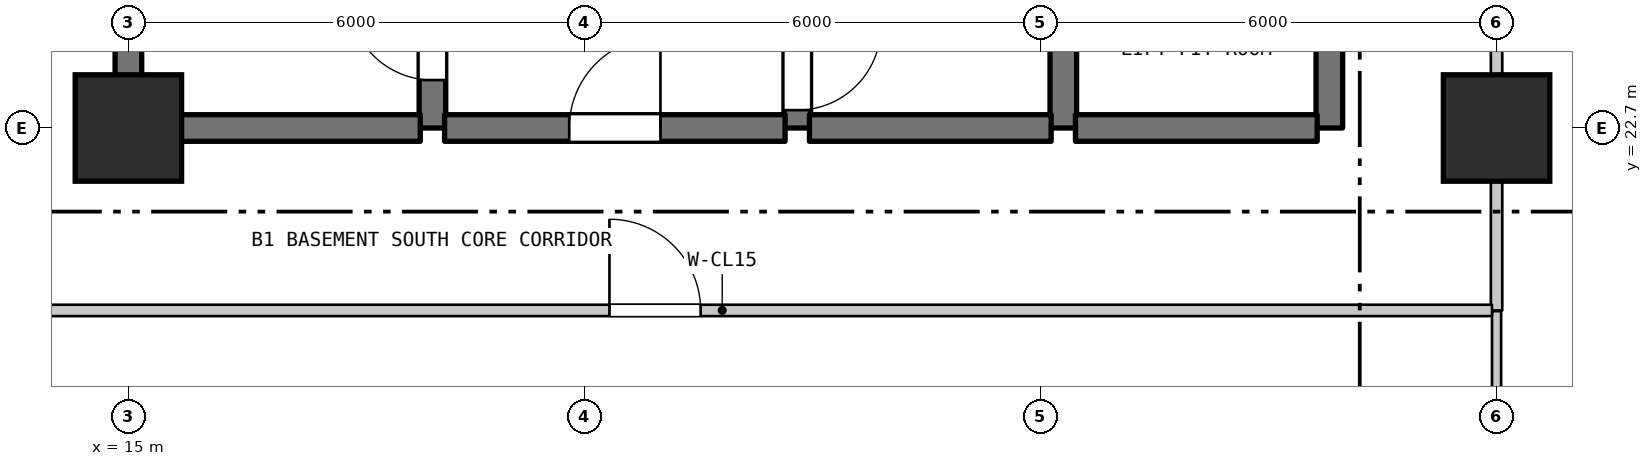
"""IFC4 building model, lengths in metres.
Left out: names, types, materials, properties, quantities, classifications, styles, units other than length and angle.
Written with IfcOpenShell. Run it as: python <this file> out.ifc"""

import sys

from ifc_helpers import new_model, si_unit, direction, frame, frame_2d, origin, origin_2d, place, context, subcontext, project, spatial, rectangle, extrude, element, fill, save


model = new_model("IFC4")
c1 = context("Model", 3, precision=1e-05, world=origin(), true_north=direction((0.0, 1.0)))
c2 = subcontext(c1, "Body", "Model", "MODEL_VIEW")
j1 = project(units=[si_unit("LENGTHUNIT", "METRE"), si_unit("PLANEANGLEUNIT", "RADIAN")], contexts=[c1])
p1 = place(None, origin())
s1 = spatial("IfcSite", under=j1, at=p1, CompositionType="ELEMENT")
p2 = place(p1, origin())
s2 = spatial("IfcBuilding", under=s1, at=p2, CompositionType="ELEMENT")
p3 = place(p2, frame((0.0, 0.0, -4.5)))
s3 = spatial("IfcBuildingStorey", under=s2, at=p3, CompositionType="ELEMENT", Elevation=-4.5)
p4 = place(p3, frame((15.0, 22.7, 0.0), z_axis=(0.0, 0.0, 1.0), x_axis=(1.0, 0.0, 0.0)))
e1 = element("IfcColumn", 1, at=p4, inside=s3, PredefinedType="COLUMN", context=c2, shape_type="SweptSolid", body=[
    extrude(rectangle(XDim=1.4, YDim=1.4, at=origin_2d()), origin(), (0.0, 0.0, 1.0), 4.5),
])
p5 = place(p3, frame((33.0, 22.7, 0.0), z_axis=(0.0, 0.0, 1.0), x_axis=(1.0, 0.0, 0.0)))
e2 = element("IfcColumn", 2, at=p5, inside=s3, PredefinedType="PILASTER", context=c2, shape_type="SweptSolid", body=[
    extrude(rectangle(XDim=1.4, YDim=1.4, at=origin_2d()), origin(), (0.0, 0.0, 1.0), 4.5),
])
p6 = place(p3, frame((15.0, 22.7, 0.0), z_axis=(0.0, 0.0, 1.0), x_axis=(0.0, 1.0, 0.0)))
e3 = element("IfcWall", 3, at=p6, inside=s3, PredefinedType="SHEAR", context=c2, shape_type="SweptSolid", body=[
    extrude(rectangle(XDim=6.8, YDim=0.35, at=frame_2d((3.4, 0.0))), origin(), (0.0, 0.0, 1.0), 4.1),
])
p7 = place(p3, frame((19.0, 22.7, 0.0), z_axis=(0.0, 0.0, 1.0), x_axis=(0.0, 1.0, 0.0)))
e4 = element("IfcWall", 4, at=p7, inside=s3, PredefinedType="SHEAR", context=c2, shape_type="SweptSolid", body=[
    extrude(rectangle(XDim=5.5, YDim=0.35, at=frame_2d((2.75, 0.0))), origin(), (0.0, 0.0, 1.0), 4.1),
])
p8 = place(p7, frame((0.631, 0.0, 0.0)))
e5 = element("IfcOpeningElement", 5, at=p8, cuts=e4, PredefinedType="OPENING", context=c2, shape_type="SweptSolid", body=[
    extrude(rectangle(XDim=1.1, YDim=2.15, at=frame_2d((0.55, 1.075))), frame((0.0, 0.185, 0.0), z_axis=(0.0, -1.0, 0.0), x_axis=(1.0, 0.0, 0.0)), (0.0, 0.0, 1.0), 0.37),
])
p9 = place(p3, frame((23.8, 22.7, 0.0), z_axis=(0.0, 0.0, 1.0), x_axis=(0.0, 1.0, 0.0)))
e6 = element("IfcWall", 6, at=p9, inside=s3, PredefinedType="SHEAR", context=c2, shape_type="SweptSolid", body=[
    extrude(rectangle(XDim=5.5, YDim=0.35, at=frame_2d((2.75, 0.0))), origin(), (0.0, 0.0, 1.0), 4.1),
])
p10 = place(p9, frame((0.235, 0.0, 0.0)))
e7 = element("IfcOpeningElement", 7, at=p10, cuts=e6, PredefinedType="OPENING", context=c2, shape_type="SweptSolid", body=[
    extrude(rectangle(XDim=1.1, YDim=2.15, at=frame_2d((0.55, 1.075))), frame((0.0, 0.185, 0.0), z_axis=(0.0, -1.0, 0.0), x_axis=(1.0, 0.0, 0.0)), (0.0, 0.0, 1.0), 0.37),
])
for number, where, z_axis, x_axis in (
    (8, (27.3, 22.7, 0.0), (0.0, 0.0, 1.0), (0.0, 1.0, 0.0)),
    (9, (30.8, 22.7, 0.0), (0.0, 0.0, 1.0), (0.0, 1.0, 0.0)),
):
    element("IfcWall", number, at=place(p3, frame(where, z_axis=z_axis, x_axis=x_axis)), inside=s3, PredefinedType="SHEAR", context=c2, shape_type="SweptSolid", body=[
        extrude(rectangle(XDim=2.9, YDim=0.35, at=frame_2d((1.45, 0.0))), origin(), (0.0, 0.0, 1.0), 4.1),
    ])
p11 = place(p3, frame((33.0, 0.71, 0.0), z_axis=(0.0, 0.0, 1.0), x_axis=(0.0, 1.0, 0.0)))
e10 = element("IfcWall", 10, at=p11, inside=s3, PredefinedType="PARTITIONING", context=c2, shape_type="SweptSolid", body=[
    extrude(rectangle(XDim=19.58, YDim=0.12, at=frame_2d((9.79, 0.0))), origin(), (0.0, 0.0, 1.0), 3.55),
])
p12 = place(p3, frame((33.0, 20.3, 0.0), z_axis=(0.0, 0.0, 1.0), x_axis=(0.0, 1.0, 0.0)))
e11 = element("IfcWall", 11, at=p12, inside=s3, PredefinedType="STANDARD", context=c2, shape_type="SweptSolid", body=[
    extrude(rectangle(XDim=2.4, YDim=0.15, at=frame_2d((1.2, 0.0))), origin(), (0.0, 0.0, 1.0), 3.55),
])
p13 = place(p3, frame((12.685, 20.3, 0.0), z_axis=(0.0, 0.0, 1.0), x_axis=(1.0, 0.0, 0.0)))
e12 = element("IfcWall", 12, at=p13, inside=s3, PredefinedType="STANDARD", context=c2, shape_type="SweptSolid", body=[
    extrude(rectangle(XDim=20.255, YDim=0.15, at=frame_2d((10.127, 0.0))), origin(), (0.0, 0.0, 1.0), 4.1),
])
p14 = place(p13, frame((8.644, 0.0, 0.0)))
e13 = element("IfcOpeningElement", 13, at=p14, cuts=e12, PredefinedType="OPENING", context=c2, shape_type="SweptSolid", body=[
    extrude(rectangle(XDim=1.2, YDim=2.2, at=frame_2d((0.6, 1.1))), frame((0.0, 0.085, 0.0), z_axis=(0.0, -1.0, 0.0), x_axis=(1.0, 0.0, 0.0)), (0.0, 0.0, 1.0), 0.17),
])
p15 = place(p3, frame((15.16, 22.7, 0.0), z_axis=(0.0, 0.0, 1.0), x_axis=(1.0, 0.0, 0.0)))
e14 = element("IfcWall", 14, at=p15, inside=s3, PredefinedType="SHEAR", context=c2, shape_type="SweptSolid", body=[
    extrude(rectangle(XDim=3.68, YDim=0.35, at=frame_2d((1.84, 0.0))), origin(), (0.0, 0.0, 1.0), 4.1),
])
p16 = place(p3, frame((19.16, 22.7, 0.0), z_axis=(0.0, 0.0, 1.0), x_axis=(1.0, 0.0, 0.0)))
e15 = element("IfcWall", 15, at=p16, inside=s3, PredefinedType="SHEAR", context=c2, shape_type="SweptSolid", body=[
    extrude(rectangle(XDim=4.48, YDim=0.35, at=frame_2d((2.24, 0.0))), origin(), (0.0, 0.0, 1.0), 4.1),
])
p17 = place(p16, frame((1.64, 0.0, 0.0)))
e16 = element("IfcOpeningElement", 16, at=p17, cuts=e15, PredefinedType="OPENING", context=c2, shape_type="SweptSolid", body=[
    extrude(rectangle(XDim=1.2, YDim=2.2, at=frame_2d((0.6, 1.1))), frame((0.0, 0.185, 0.0), z_axis=(0.0, -1.0, 0.0), x_axis=(1.0, 0.0, 0.0)), (0.0, 0.0, 1.0), 0.37),
])
for number, where, z_axis, x_axis in (
    (17, (23.96, 22.7, 0.0), (0.0, 0.0, 1.0), (1.0, 0.0, 0.0)),
    (18, (27.46, 22.7, 0.0), (0.0, 0.0, 1.0), (1.0, 0.0, 0.0)),
):
    element("IfcWall", number, at=place(p3, frame(where, z_axis=z_axis, x_axis=x_axis)), inside=s3, PredefinedType="SHEAR", context=c2, shape_type="SweptSolid", body=[
        extrude(rectangle(XDim=3.18, YDim=0.35, at=frame_2d((1.59, 0.0))), origin(), (0.0, 0.0, 1.0), 4.1),
    ])
p18 = place(p3, frame((33.0, 22.7, 0.0), z_axis=(0.0, 0.0, 1.0), x_axis=(0.0, 1.0, 0.0)))
e19 = element("IfcWall", 19, at=p18, inside=s3, PredefinedType="STANDARD", context=c2, shape_type="SweptSolid", body=[
    extrude(rectangle(XDim=15.2, YDim=0.15, at=frame_2d((7.6, 0.0))), origin(), (0.0, 0.0, 1.0), 3.5),
])
p19 = place(p18, frame((7.575, 0.0, 0.0)))
e20 = element("IfcOpeningElement", 20, at=p19, cuts=e19, PredefinedType="OPENING", context=c2, shape_type="SweptSolid", body=[
    extrude(rectangle(XDim=1.2, YDim=2.2, at=frame_2d((0.6, 1.1))), frame((0.0, 0.085, 0.0), z_axis=(0.0, -1.0, 0.0), x_axis=(1.0, 0.0, 0.0)), (0.0, 0.0, 1.0), 0.17),
])
p20 = place(p8, origin())
e21 = element("IfcDoor", 21, at=p20, inside=s3, OperationType="SINGLE_SWING_RIGHT", PredefinedType="DOOR", context=c2, shape_type="SweptSolid", body=[
    extrude(rectangle(XDim=1.1, YDim=2.15, at=frame_2d((0.55, 1.075))), frame((0.0, 0.025, 0.0), z_axis=(0.0, -1.0, 0.0), x_axis=(1.0, 0.0, 0.0)), (0.0, 0.0, 1.0), 0.05),
])
fill(e5, e21)
p21 = place(p10, frame((1.1, 0.0, 0.0), z_axis=(0.0, 0.0, 1.0), x_axis=(-1.0, 0.0, 0.0)))
e22 = element("IfcDoor", 22, at=p21, inside=s3, OperationType="SINGLE_SWING_RIGHT", PredefinedType="DOOR", context=c2, shape_type="SweptSolid", body=[
    extrude(rectangle(XDim=1.1, YDim=2.15, at=frame_2d((0.55, 1.075))), frame((0.0, 0.025, 0.0), z_axis=(0.0, -1.0, 0.0), x_axis=(1.0, 0.0, 0.0)), (0.0, 0.0, 1.0), 0.05),
])
fill(e7, e22)
p22 = place(p14, origin())
e23 = element("IfcDoor", 23, at=p22, inside=s3, OperationType="SINGLE_SWING_LEFT", PredefinedType="DOOR", context=c2, shape_type="SweptSolid", body=[
    extrude(rectangle(XDim=1.2, YDim=2.2, at=frame_2d((0.6, 1.1))), frame((0.0, 0.025, 0.0), z_axis=(0.0, -1.0, 0.0), x_axis=(1.0, 0.0, 0.0)), (0.0, 0.0, 1.0), 0.05),
])
fill(e13, e23)
p23 = place(p17, origin())
e24 = element("IfcDoor", 24, at=p23, inside=s3, OperationType="SINGLE_SWING_RIGHT", PredefinedType="DOOR", context=c2, shape_type="SweptSolid", body=[
    extrude(rectangle(XDim=1.2, YDim=2.2, at=frame_2d((0.6, 1.1))), frame((0.0, 0.025, 0.0), z_axis=(0.0, -1.0, 0.0), x_axis=(1.0, 0.0, 0.0)), (0.0, 0.0, 1.0), 0.05),
])
fill(e16, e24)
save(model, sys.argv[1])
